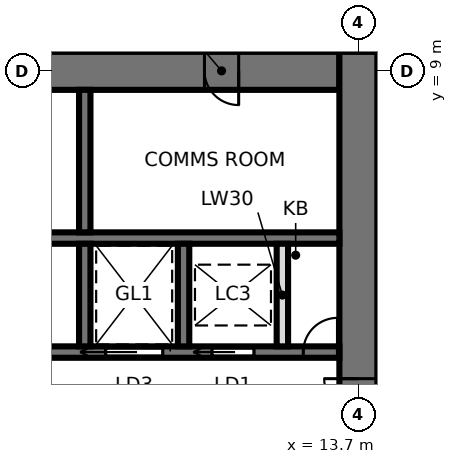
"""IFC4 building model, lengths in metres.
Left out: names, types, materials, properties, quantities, classifications, styles, units other than length and angle.
Written with IfcOpenShell. Run it as: python <this file> out.ifc"""

import sys

from ifc_helpers import new_model, si_unit, direction, frame, frame_2d, origin, place, context, subcontext, project, spatial, rectangle, extrude, element, fill, save


model = new_model("IFC4")
c1 = context("Model", 3, precision=1e-05, world=origin(), true_north=direction((0.0, 1.0)))
c2 = subcontext(c1, "Body", "Model", "MODEL_VIEW")
j1 = project(units=[si_unit("LENGTHUNIT", "METRE"), si_unit("PLANEANGLEUNIT", "RADIAN")], contexts=[c1])
p1 = place(None, origin())
s1 = spatial("IfcSite", under=j1, at=p1, CompositionType="ELEMENT")
p2 = place(p1, origin())
s2 = spatial("IfcBuilding", under=s1, at=p2, CompositionType="ELEMENT")
p3 = place(p2, frame((0.0, 0.0, 226.7)))
s3 = spatial("IfcBuildingStorey", under=s2, at=p3, CompositionType="ELEMENT", Elevation=226.7)
p4 = place(p3, frame((13.2, 9.0, 0.0), z_axis=(0.0, 0.0, 1.0), x_axis=(-1.0, 0.0, 0.0)))
e1 = element("IfcWall", 1, at=p4, inside=s3, PredefinedType="SHEAR", context=c2, shape_type="SweptSolid", body=[
    extrude(rectangle(XDim=26.4, YDim=1.0, at=frame_2d((13.2, 0.0))), origin(), (0.0, 0.0, 1.0), 3.9),
])
p5 = place(p4, frame((2.65, 0.0, 0.0)))
e2 = element("IfcOpeningElement", 2, at=p5, cuts=e1, PredefinedType="OPENING", context=c2, shape_type="SweptSolid", body=[
    extrude(rectangle(XDim=0.9, YDim=2.1, at=frame_2d((0.45, 1.05))), frame((0.0, 0.51, 0.0), z_axis=(0.0, -1.0, 0.0), x_axis=(1.0, 0.0, 0.0)), (0.0, 0.0, 1.0), 1.02),
])
p6 = place(p4, frame((9.5, 0.0, 0.0)))
e3 = element("IfcOpeningElement", 3, at=p6, cuts=e1, PredefinedType="OPENING", context=c2, shape_type="SweptSolid", body=[
    extrude(rectangle(XDim=0.9, YDim=2.1, at=frame_2d((0.45, 1.05))), frame((0.0, 0.51, 0.0), z_axis=(0.0, -1.0, 0.0), x_axis=(1.0, 0.0, 0.0)), (0.0, 0.0, 1.0), 1.02),
])
p7 = place(p4, frame((16.0, 0.0, 0.0)))
e4 = element("IfcOpeningElement", 4, at=p7, cuts=e1, PredefinedType="OPENING", context=c2, shape_type="SweptSolid", body=[
    extrude(rectangle(XDim=0.9, YDim=2.1, at=frame_2d((0.45, 1.05))), frame((0.0, 0.51, 0.0), z_axis=(0.0, -1.0, 0.0), x_axis=(1.0, 0.0, 0.0)), (0.0, 0.0, 1.0), 1.02),
])
p8 = place(p4, frame((21.25, 0.0, 0.0)))
e5 = element("IfcOpeningElement", 5, at=p8, cuts=e1, PredefinedType="OPENING", context=c2, shape_type="SweptSolid", body=[
    extrude(rectangle(XDim=0.9, YDim=2.1, at=frame_2d((0.45, 1.05))), frame((0.0, 0.51, 0.0), z_axis=(0.0, -1.0, 0.0), x_axis=(1.0, 0.0, 0.0)), (0.0, 0.0, 1.0), 1.02),
])
p9 = place(p4, frame((24.8, 0.0, 0.0)))
e6 = element("IfcOpeningElement", 6, at=p9, cuts=e1, PredefinedType="OPENING", context=c2, shape_type="SweptSolid", body=[
    extrude(rectangle(XDim=1.0, YDim=2.1, at=frame_2d((0.5, 1.05))), frame((0.0, 0.51, 0.0), z_axis=(0.0, -1.0, 0.0), x_axis=(1.0, 0.0, 0.0)), (0.0, 0.0, 1.0), 1.02),
])
p10 = place(p3, frame((13.7, -9.5, 0.0), z_axis=(0.0, 0.0, 1.0), x_axis=(0.0, 1.0, 0.0)))
e7 = element("IfcWall", 7, at=p10, inside=s3, PredefinedType="SHEAR", context=c2, shape_type="SweptSolid", body=[
    extrude(rectangle(XDim=19.0, YDim=1.0, at=frame_2d((9.5, 0.0))), origin(), (0.0, 0.0, 1.0), 3.9),
])
p11 = place(p10, frame((8.6, 0.0, 0.0)))
e8 = element("IfcOpeningElement", 8, at=p11, cuts=e7, PredefinedType="OPENING", context=c2, shape_type="SweptSolid", body=[
    extrude(rectangle(XDim=1.8, YDim=2.4, at=frame_2d((0.9, 1.2))), frame((0.0, 0.51, 0.0), z_axis=(0.0, -1.0, 0.0), x_axis=(1.0, 0.0, 0.0)), (0.0, 0.0, 1.0), 1.02),
])
p12 = place(p3, frame((-13.2, 1.6, 0.0), z_axis=(0.0, 0.0, 1.0), x_axis=(1.0, 0.0, 0.0)))
e9 = element("IfcWall", 9, at=p12, inside=s3, PredefinedType="SHEAR", context=c2, shape_type="SweptSolid", body=[
    extrude(rectangle(XDim=26.4, YDim=0.3, at=frame_2d((13.2, 0.0))), origin(), (0.0, 0.0, 1.0), 3.9),
])
p13 = place(p12, frame((0.25, 0.0, 0.0)))
e10 = element("IfcOpeningElement", 10, at=p13, cuts=e9, PredefinedType="OPENING", context=c2, shape_type="SweptSolid", body=[
    extrude(rectangle(XDim=1.0, YDim=2.1, at=frame_2d((0.5, 1.05))), frame((0.0, 0.16, 0.0), z_axis=(0.0, -1.0, 0.0), x_axis=(1.0, 0.0, 0.0)), (0.0, 0.0, 1.0), 0.32),
])
p14 = place(p12, frame((23.05, 0.0, 0.0)))
e11 = element("IfcOpeningElement", 11, at=p14, cuts=e9, PredefinedType="OPENING", context=c2, shape_type="SweptSolid", body=[
    extrude(rectangle(XDim=1.1, YDim=2.3, at=frame_2d((0.55, 1.15))), frame((0.0, 0.16, 0.0), z_axis=(0.0, -1.0, 0.0), x_axis=(1.0, 0.0, 0.0)), (0.0, 0.0, 1.0), 0.32),
])
p15 = place(p12, frame((20.25, 0.0, 0.0)))
e12 = element("IfcOpeningElement", 12, at=p15, cuts=e9, PredefinedType="OPENING", context=c2, shape_type="SweptSolid", body=[
    extrude(rectangle(XDim=1.5, YDim=2.4, at=frame_2d((0.75, 1.2))), frame((0.0, 0.16, 0.0), z_axis=(0.0, -1.0, 0.0), x_axis=(1.0, 0.0, 0.0)), (0.0, 0.0, 1.0), 0.32),
])
p16 = place(p12, frame((6.95, 0.0, 0.0)))
e13 = element("IfcOpeningElement", 13, at=p16, cuts=e9, PredefinedType="OPENING", context=c2, shape_type="SweptSolid", body=[
    extrude(rectangle(XDim=0.9, YDim=2.1, at=frame_2d((0.45, 1.05))), frame((0.0, 0.16, 0.0), z_axis=(0.0, -1.0, 0.0), x_axis=(1.0, 0.0, 0.0)), (0.0, 0.0, 1.0), 0.32),
])
p17 = place(p12, frame((9.55, 0.0, 0.0)))
e14 = element("IfcOpeningElement", 14, at=p17, cuts=e9, PredefinedType="OPENING", context=c2, shape_type="SweptSolid", body=[
    extrude(rectangle(XDim=0.9, YDim=2.1, at=frame_2d((0.45, 1.05))), frame((0.0, 0.16, 0.0), z_axis=(0.0, -1.0, 0.0), x_axis=(1.0, 0.0, 0.0)), (0.0, 0.0, 1.0), 0.32),
])
p18 = place(p12, frame((12.15, 0.0, 0.0)))
e15 = element("IfcOpeningElement", 15, at=p18, cuts=e9, PredefinedType="OPENING", context=c2, shape_type="SweptSolid", body=[
    extrude(rectangle(XDim=0.9, YDim=2.1, at=frame_2d((0.45, 1.05))), frame((0.0, 0.16, 0.0), z_axis=(0.0, -1.0, 0.0), x_axis=(1.0, 0.0, 0.0)), (0.0, 0.0, 1.0), 0.32),
])
p19 = place(p12, frame((25.45, 0.0, 0.0)))
e16 = element("IfcOpeningElement", 16, at=p19, cuts=e9, PredefinedType="OPENING", context=c2, shape_type="SweptSolid", body=[
    extrude(rectangle(XDim=0.9, YDim=2.1, at=frame_2d((0.45, 1.05))), frame((0.0, 0.16, 0.0), z_axis=(0.0, -1.0, 0.0), x_axis=(1.0, 0.0, 0.0)), (0.0, 0.0, 1.0), 0.32),
])
p20 = place(p3, frame((-13.2, 4.6, 0.0), z_axis=(0.0, 0.0, 1.0), x_axis=(1.0, 0.0, 0.0)))
e17 = element("IfcWall", 17, at=p20, inside=s3, PredefinedType="SHEAR", context=c2, shape_type="SweptSolid", body=[
    extrude(rectangle(XDim=26.4, YDim=0.3, at=frame_2d((13.2, 0.0))), origin(), (0.0, 0.0, 1.0), 3.9),
])
p21 = place(p3, frame((6.5, 1.75, 0.0), z_axis=(0.0, 0.0, 1.0), x_axis=(0.0, 1.0, 0.0)))
e18 = element("IfcWall", 18, at=p21, inside=s3, PredefinedType="SHEAR", context=c2, shape_type="SweptSolid", body=[
    extrude(rectangle(XDim=2.7, YDim=0.3, at=frame_2d((1.35, 0.0))), origin(), (0.0, 0.0, 1.0), 3.9),
])
p22 = place(p3, frame((6.5, 4.75, 0.0), z_axis=(0.0, 0.0, 1.0), x_axis=(0.0, 1.0, 0.0)))
e19 = element("IfcWall", 19, at=p22, inside=s3, PredefinedType="SHEAR", context=c2, shape_type="SweptSolid", body=[
    extrude(rectangle(XDim=3.75, YDim=0.3, at=frame_2d((1.875, 0.0))), origin(), (0.0, 0.0, 1.0), 3.9),
])
p23 = place(p3, frame((9.1, 1.75, 0.0), z_axis=(0.0, 0.0, 1.0), x_axis=(0.0, 1.0, 0.0)))
e20 = element("IfcWall", 20, at=p23, inside=s3, PredefinedType="SHEAR", context=c2, shape_type="SweptSolid", body=[
    extrude(rectangle(XDim=2.7, YDim=0.3, at=frame_2d((1.35, 0.0))), origin(), (0.0, 0.0, 1.0), 3.9),
])
p24 = place(p3, frame((11.7, 1.75, 0.0), z_axis=(0.0, 0.0, 1.0), x_axis=(0.0, 1.0, 0.0)))
e21 = element("IfcWall", 21, at=p24, inside=s3, PredefinedType="SOLIDWALL", context=c2, shape_type="SweptSolid", body=[
    extrude(rectangle(XDim=2.7, YDim=0.3, at=frame_2d((1.35, 0.0))), origin(), (0.0, 0.0, 1.0), 3.74),
])
p25 = place(p11, origin())
e22 = element("IfcDoor", 22, at=p25, inside=s3, OperationType="DOUBLE_DOOR_SINGLE_SWING", PredefinedType="DOOR", context=c2, shape_type="SweptSolid", body=[
    extrude(rectangle(XDim=1.72, YDim=2.36, at=frame_2d((0.9, 1.18))), frame((0.0, 0.025, 0.0), z_axis=(0.0, -1.0, 0.0), x_axis=(1.0, 0.0, 0.0)), (0.0, 0.0, 1.0), 0.05),
    extrude(rectangle(XDim=0.04, YDim=2.4, at=frame_2d((0.02, 1.2))), frame((0.0, 0.25, 0.0), z_axis=(0.0, -1.0, 0.0), x_axis=(1.0, 0.0, 0.0)), (0.0, 0.0, 1.0), 0.5),
    extrude(rectangle(XDim=0.04, YDim=2.4, at=frame_2d((1.78, 1.2))), frame((0.0, 0.25, 0.0), z_axis=(0.0, -1.0, 0.0), x_axis=(1.0, 0.0, 0.0)), (0.0, 0.0, 1.0), 0.5),
    extrude(rectangle(XDim=1.72, YDim=0.04, at=frame_2d((0.9, 2.38))), frame((0.0, 0.25, 0.0), z_axis=(0.0, -1.0, 0.0), x_axis=(1.0, 0.0, 0.0)), (0.0, 0.0, 1.0), 0.5),
])
fill(e8, e22)
p26 = place(p14, origin())
e23 = element("IfcDoor", 23, at=p26, inside=s3, OperationType="SLIDING_TO_LEFT", PredefinedType="DOOR", context=c2, shape_type="SweptSolid", body=[
    extrude(rectangle(XDim=1.1, YDim=2.3, at=frame_2d((0.55, 1.15))), frame((0.0, 0.025, 0.0), z_axis=(0.0, -1.0, 0.0), x_axis=(1.0, 0.0, 0.0)), (0.0, 0.0, 1.0), 0.05),
])
fill(e11, e23)
p27 = place(p15, origin())
e24 = element("IfcDoor", 24, at=p27, inside=s3, OperationType="SLIDING_TO_LEFT", PredefinedType="DOOR", context=c2, shape_type="SweptSolid", body=[
    extrude(rectangle(XDim=1.5, YDim=2.4, at=frame_2d((0.75, 1.2))), frame((0.0, 0.025, 0.0), z_axis=(0.0, -1.0, 0.0), x_axis=(1.0, 0.0, 0.0)), (0.0, 0.0, 1.0), 0.05),
])
fill(e12, e24)
p28 = place(p19, origin())
e25 = element("IfcDoor", 25, at=p28, inside=s3, OperationType="SINGLE_SWING_RIGHT", PredefinedType="DOOR", context=c2, shape_type="SweptSolid", body=[
    extrude(rectangle(XDim=0.9, YDim=2.1, at=frame_2d((0.45, 1.05))), frame((0.0, 0.025, 0.0), z_axis=(0.0, -1.0, 0.0), x_axis=(1.0, 0.0, 0.0)), (0.0, 0.0, 1.0), 0.05),
])
fill(e16, e25)
p29 = place(p5, origin())
e26 = element("IfcDoor", 26, at=p29, inside=s3, OperationType="SINGLE_SWING_LEFT", PredefinedType="DOOR", context=c2, shape_type="SweptSolid", body=[
    extrude(rectangle(XDim=0.82, YDim=2.06, at=frame_2d((0.45, 1.03))), frame((0.0, 0.025, 0.0), z_axis=(0.0, -1.0, 0.0), x_axis=(1.0, 0.0, 0.0)), (0.0, 0.0, 1.0), 0.05),
    extrude(rectangle(XDim=0.04, YDim=2.1, at=frame_2d((0.02, 1.05))), frame((0.0, 0.25, 0.0), z_axis=(0.0, -1.0, 0.0), x_axis=(1.0, 0.0, 0.0)), (0.0, 0.0, 1.0), 0.5),
    extrude(rectangle(XDim=0.04, YDim=2.1, at=frame_2d((0.88, 1.05))), frame((0.0, 0.25, 0.0), z_axis=(0.0, -1.0, 0.0), x_axis=(1.0, 0.0, 0.0)), (0.0, 0.0, 1.0), 0.5),
    extrude(rectangle(XDim=0.82, YDim=0.04, at=frame_2d((0.45, 2.08))), frame((0.0, 0.25, 0.0), z_axis=(0.0, -1.0, 0.0), x_axis=(1.0, 0.0, 0.0)), (0.0, 0.0, 1.0), 0.5),
])
fill(e2, e26)
save(model, sys.argv[1])
